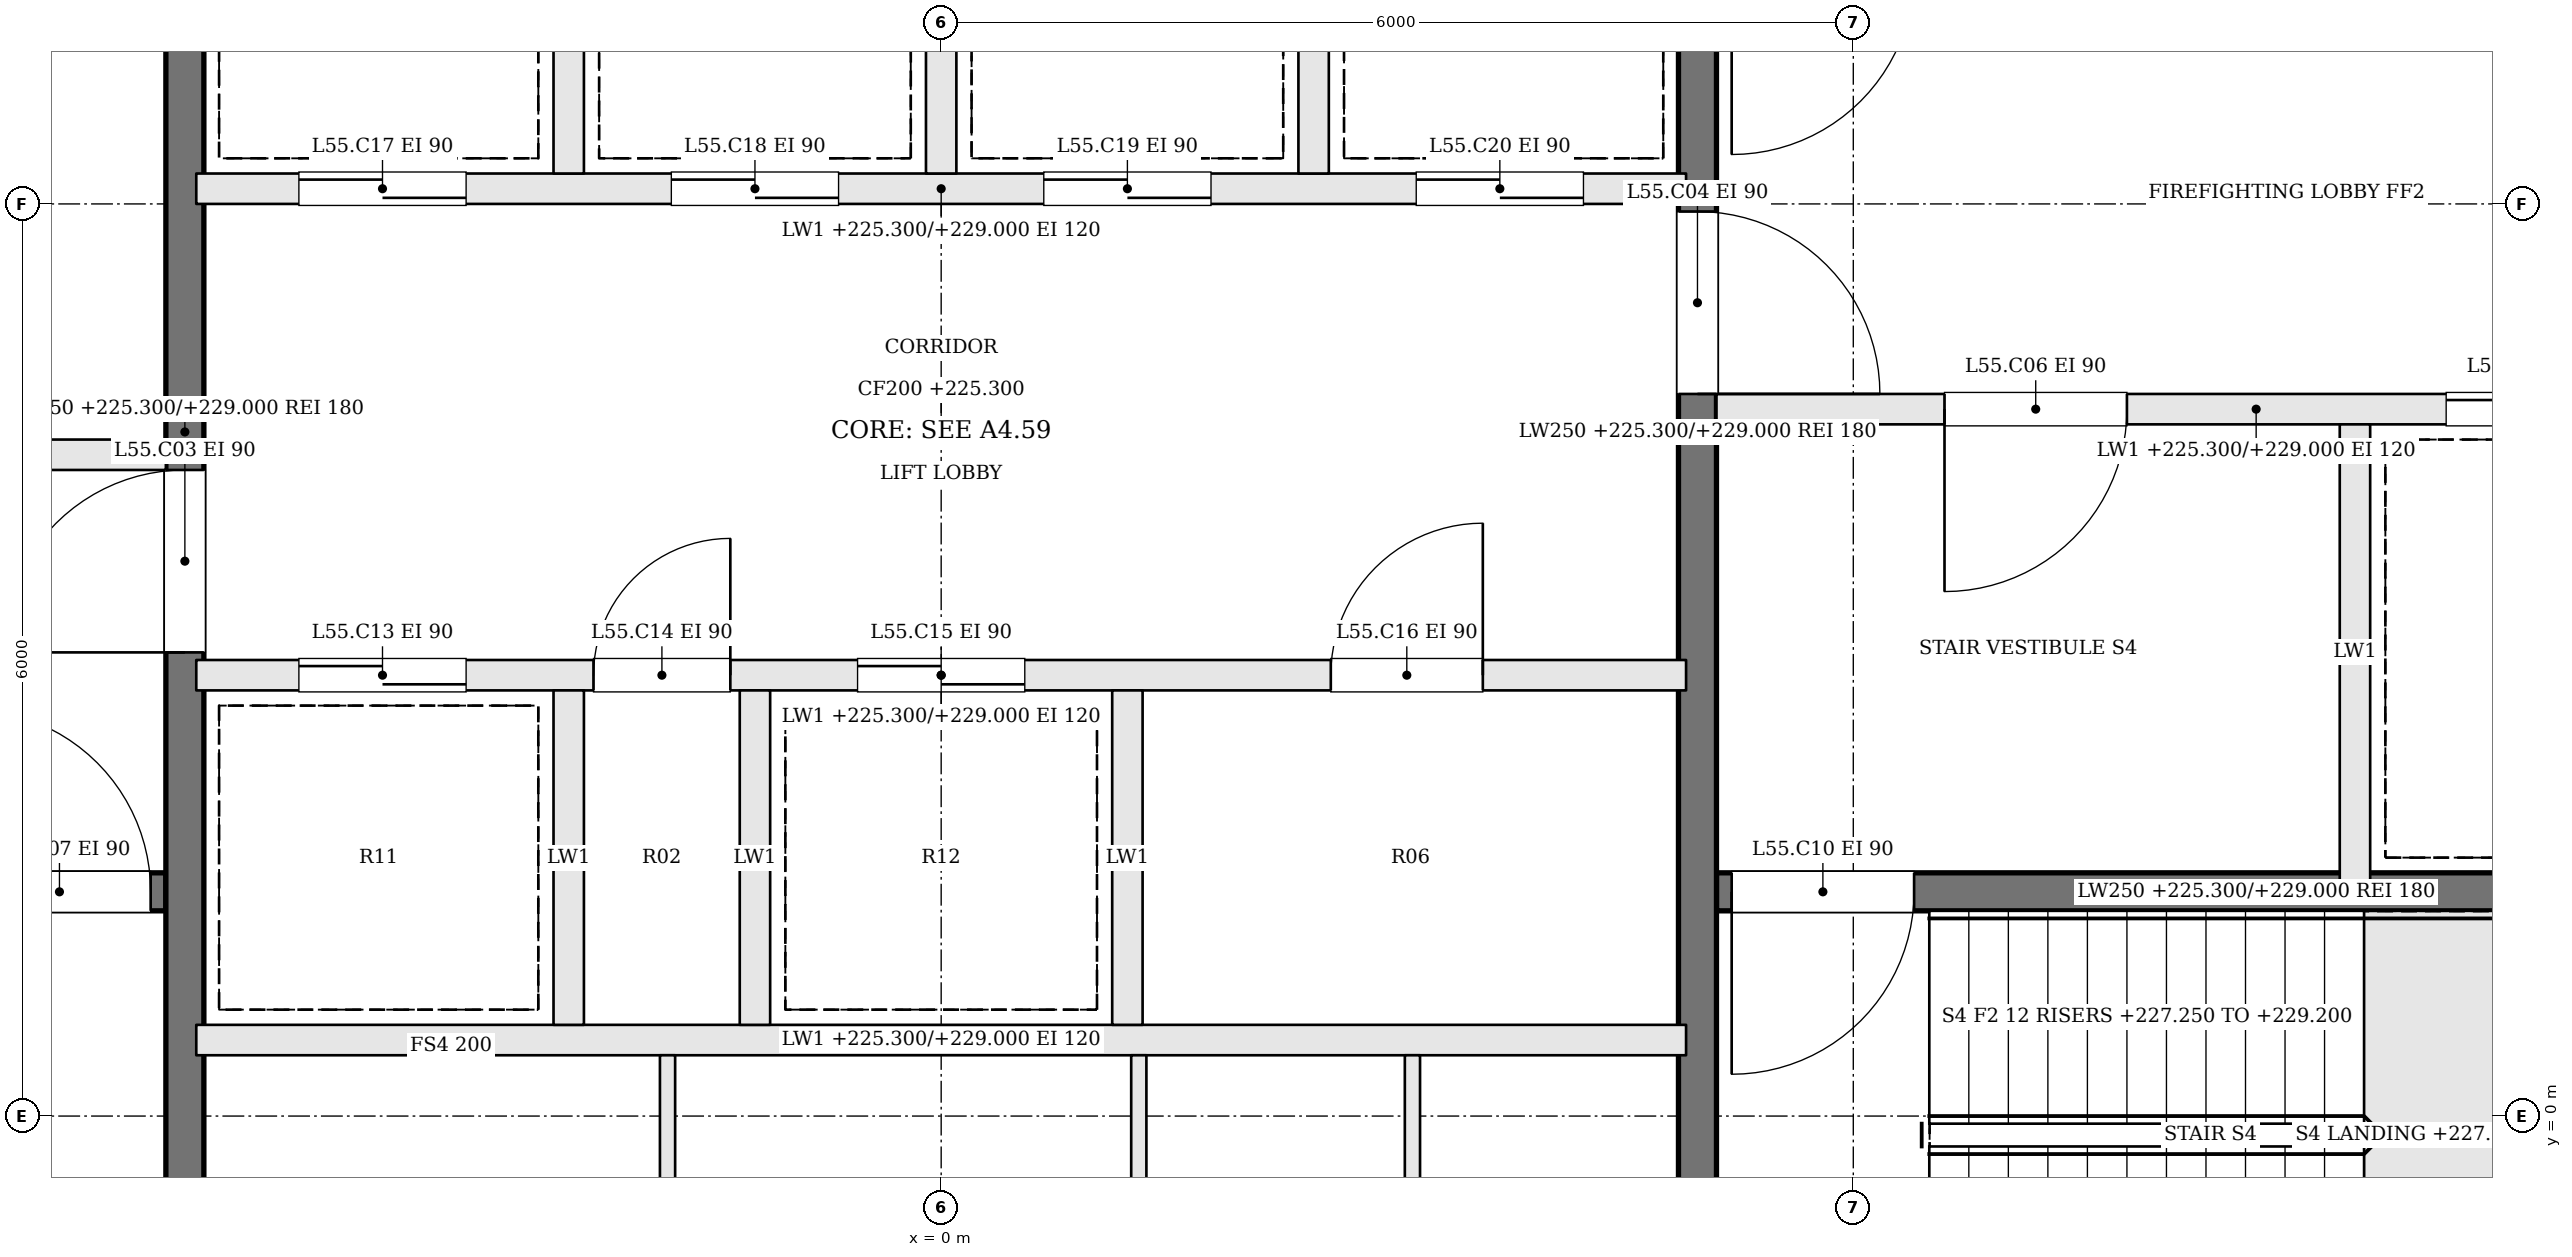
"""IFC4 building model, lengths in metres.
Left out: names, types, materials, properties, quantities, classifications, styles, units other than length and angle.
Written with IfcOpenShell. Run it as: python <this file> out.ifc"""

import sys

from ifc_helpers import new_model, si_unit, direction, frame, frame_2d, origin, place, context, subcontext, project, spatial, rectangle, extrude, element, fill, save


model = new_model("IFC4")
c1 = context("Model", 3, precision=1e-05, world=origin(), true_north=direction((0.0, 1.0)))
c2 = subcontext(c1, "Body", "Model", "MODEL_VIEW")
j1 = project(units=[si_unit("LENGTHUNIT", "METRE"), si_unit("PLANEANGLEUNIT", "RADIAN")], contexts=[c1])
p1 = place(None, origin())
s1 = spatial("IfcSite", under=j1, at=p1, CompositionType="ELEMENT")
p2 = place(p1, origin())
s2 = spatial("IfcBuilding", under=s1, at=p2, CompositionType="ELEMENT")
p3 = place(p2, frame((0.0, 0.0, 225.3)))
s3 = spatial("IfcBuildingStorey", under=s2, at=p3, CompositionType="ELEMENT", Elevation=225.3)
p4 = place(p3, frame((-12.2, 1.475, 0.0), z_axis=(0.0, 0.0, 1.0), x_axis=(1.0, 0.0, 0.0)))
e1 = element("IfcWall", 1, at=p4, inside=s3, PredefinedType="SOLIDWALL", context=c2, shape_type="SweptSolid", body=[
    extrude(rectangle(XDim=7.1, YDim=0.25, at=frame_2d((3.55, 0.0))), origin(), (0.0, 0.0, 1.0), 3.7),
])
p5 = place(p4, frame((5.8, 0.0, 0.0)))
e2 = element("IfcOpeningElement", 2, at=p5, cuts=e1, PredefinedType="OPENING", context=c2, shape_type="SweptSolid", body=[
    extrude(rectangle(XDim=1.2, YDim=2.1, at=frame_2d((0.6, 1.05))), frame((0.0, 0.135, 0.0), z_axis=(0.0, -1.0, 0.0), x_axis=(1.0, 0.0, 0.0)), (0.0, 0.0, 1.0), 0.27),
])
p6 = place(p3, frame((-12.2, 4.35, 0.0), z_axis=(0.0, 0.0, 1.0), x_axis=(1.0, 0.0, 0.0)))
e3 = element("IfcWall", 3, at=p6, inside=s3, PredefinedType="SOLIDWALL", context=c2, shape_type="SweptSolid", body=[
    extrude(rectangle(XDim=7.1, YDim=0.2, at=frame_2d((3.55, 0.0))), origin(), (0.0, 0.0, 1.0), 3.7),
])
p7 = place(p6, frame((4.4, 0.0, 0.0)))
e4 = element("IfcOpeningElement", 4, at=p7, cuts=e3, PredefinedType="OPENING", context=c2, shape_type="SweptSolid", body=[
    extrude(rectangle(XDim=1.2, YDim=2.1, at=frame_2d((0.6, 1.05))), frame((0.0, 0.11, 0.0), z_axis=(0.0, -1.0, 0.0), x_axis=(1.0, 0.0, 0.0)), (0.0, 0.0, 1.0), 0.22),
])
p8 = place(p6, frame((1.1, 0.0, 0.0)))
e5 = element("IfcOpeningElement", 5, at=p8, cuts=e3, PredefinedType="OPENING", context=c2, shape_type="SweptSolid", body=[
    extrude(rectangle(XDim=1.2, YDim=2.1, at=frame_2d((0.6, 1.05))), frame((0.0, 0.11, 0.0), z_axis=(0.0, -1.0, 0.0), x_axis=(1.0, 0.0, 0.0)), (0.0, 0.0, 1.0), 0.22),
])
p9 = place(p3, frame((12.2, 4.65, 0.0), z_axis=(0.0, 0.0, 1.0), x_axis=(-1.0, 0.0, 0.0)))
e6 = element("IfcWall", 6, at=p9, inside=s3, PredefinedType="SOLIDWALL", context=c2, shape_type="SweptSolid", body=[
    extrude(rectangle(XDim=7.1, YDim=0.2, at=frame_2d((3.55, 0.0))), origin(), (0.0, 0.0, 1.0), 3.7),
])
p10 = place(p9, frame((4.4, 0.0, 0.0)))
e7 = element("IfcOpeningElement", 7, at=p10, cuts=e6, PredefinedType="OPENING", context=c2, shape_type="SweptSolid", body=[
    extrude(rectangle(XDim=1.2, YDim=2.1, at=frame_2d((0.6, 1.05))), frame((0.0, 0.11, 0.0), z_axis=(0.0, -1.0, 0.0), x_axis=(1.0, 0.0, 0.0)), (0.0, 0.0, 1.0), 0.22),
])
p11 = place(p9, frame((1.1, 0.0, 0.0)))
e8 = element("IfcOpeningElement", 8, at=p11, cuts=e6, PredefinedType="OPENING", context=c2, shape_type="SweptSolid", body=[
    extrude(rectangle(XDim=1.2, YDim=2.1, at=frame_2d((0.6, 1.05))), frame((0.0, 0.11, 0.0), z_axis=(0.0, -1.0, 0.0), x_axis=(1.0, 0.0, 0.0)), (0.0, 0.0, 1.0), 0.22),
])
p12 = place(p3, frame((12.2, 1.475, 0.0), z_axis=(0.0, 0.0, 1.0), x_axis=(-1.0, 0.0, 0.0)))
e9 = element("IfcWall", 9, at=p12, inside=s3, PredefinedType="SOLIDWALL", context=c2, shape_type="SweptSolid", body=[
    extrude(rectangle(XDim=7.1, YDim=0.25, at=frame_2d((3.55, 0.0))), origin(), (0.0, 0.0, 1.0), 3.7),
])
p13 = place(p12, frame((5.8, 0.0, 0.0)))
e10 = element("IfcOpeningElement", 10, at=p13, cuts=e9, PredefinedType="OPENING", context=c2, shape_type="SweptSolid", body=[
    extrude(rectangle(XDim=1.2, YDim=2.1, at=frame_2d((0.6, 1.05))), frame((0.0, 0.135, 0.0), z_axis=(0.0, -1.0, 0.0), x_axis=(1.0, 0.0, 0.0)), (0.0, 0.0, 1.0), 0.27),
])
p14 = place(p3, frame((9.3, 4.55, 0.0), z_axis=(0.0, 0.0, 1.0), x_axis=(0.0, -1.0, 0.0)))
e11 = element("IfcWall", 11, at=p14, inside=s3, PredefinedType="SOLIDWALL", context=c2, shape_type="SweptSolid", body=[
    extrude(rectangle(XDim=3.0, YDim=0.2, at=frame_2d((1.5, 0.0))), origin(), (0.0, 0.0, 1.0), 3.7),
])
p15 = place(p3, frame((-4.975, -2.2, 0.0), z_axis=(0.0, 0.0, 1.0), x_axis=(0.0, 1.0, 0.0)))
e12 = element("IfcWall", 12, at=p15, inside=s3, PredefinedType="SOLIDWALL", context=c2, shape_type="SweptSolid", body=[
    extrude(rectangle(XDim=13.4, YDim=0.25, at=frame_2d((6.7, 0.0))), origin(), (0.0, 0.0, 1.0), 3.7),
])
p16 = place(p15, frame((5.25, 0.0, 0.0)))
e13 = element("IfcOpeningElement", 13, at=p16, cuts=e12, PredefinedType="OPENING", context=c2, shape_type="SweptSolid", body=[
    extrude(rectangle(XDim=1.2, YDim=2.1, at=frame_2d((0.6, 1.05))), frame((0.0, 0.135, 0.0), z_axis=(0.0, -1.0, 0.0), x_axis=(1.0, 0.0, 0.0)), (0.0, 0.0, 1.0), 0.27),
])
p17 = place(p3, frame((4.975, 11.2, 0.0), z_axis=(0.0, 0.0, 1.0), x_axis=(0.0, -1.0, 0.0)))
e14 = element("IfcWall", 14, at=p17, inside=s3, PredefinedType="SOLIDWALL", context=c2, shape_type="SweptSolid", body=[
    extrude(rectangle(XDim=13.4, YDim=0.25, at=frame_2d((6.7, 0.0))), origin(), (0.0, 0.0, 1.0), 3.7),
])
p18 = place(p17, frame((5.25, 0.0, 0.0)))
e15 = element("IfcOpeningElement", 15, at=p18, cuts=e14, PredefinedType="OPENING", context=c2, shape_type="SweptSolid", body=[
    extrude(rectangle(XDim=1.2, YDim=2.1, at=frame_2d((0.6, 1.05))), frame((0.0, 0.135, 0.0), z_axis=(0.0, -1.0, 0.0), x_axis=(1.0, 0.0, 0.0)), (0.0, 0.0, 1.0), 0.27),
])
p19 = place(p3, frame((-4.9, 0.5, 0.0), z_axis=(0.0, 0.0, 1.0), x_axis=(1.0, 0.0, 0.0)))
e16 = element("IfcWall", 16, at=p19, inside=s3, PredefinedType="SOLIDWALL", context=c2, shape_type="SweptSolid", body=[
    extrude(rectangle(XDim=9.8, YDim=0.2, at=frame_2d((4.9, 0.0))), origin(), (0.0, 0.0, 1.0), 3.7),
])
p20 = place(p3, frame((-4.9, 2.9, 0.0), z_axis=(0.0, 0.0, 1.0), x_axis=(1.0, 0.0, 0.0)))
e17 = element("IfcWall", 17, at=p20, inside=s3, PredefinedType="SOLIDWALL", context=c2, shape_type="SweptSolid", body=[
    extrude(rectangle(XDim=9.8, YDim=0.2, at=frame_2d((4.9, 0.0))), origin(), (0.0, 0.0, 1.0), 3.7),
])
p21 = place(p20, frame((0.675, 0.0, 0.0)))
e18 = element("IfcOpeningElement", 18, at=p21, cuts=e17, PredefinedType="OPENING", context=c2, shape_type="SweptSolid", body=[
    extrude(rectangle(XDim=1.1, YDim=2.1, at=frame_2d((0.55, 1.05))), frame((0.0, 0.11, 0.0), z_axis=(0.0, -1.0, 0.0), x_axis=(1.0, 0.0, 0.0)), (0.0, 0.0, 1.0), 0.22),
])
p22 = place(p20, frame((2.613, 0.0, 0.0)))
e19 = element("IfcOpeningElement", 19, at=p22, cuts=e17, PredefinedType="OPENING", context=c2, shape_type="SweptSolid", body=[
    extrude(rectangle(XDim=0.9, YDim=2.1, at=frame_2d((0.45, 1.05))), frame((0.0, 0.11, 0.0), z_axis=(0.0, -1.0, 0.0), x_axis=(1.0, 0.0, 0.0)), (0.0, 0.0, 1.0), 0.22),
])
p23 = place(p20, frame((4.35, 0.0, 0.0)))
e20 = element("IfcOpeningElement", 20, at=p23, cuts=e17, PredefinedType="OPENING", context=c2, shape_type="SweptSolid", body=[
    extrude(rectangle(XDim=1.1, YDim=2.1, at=frame_2d((0.55, 1.05))), frame((0.0, 0.11, 0.0), z_axis=(0.0, -1.0, 0.0), x_axis=(1.0, 0.0, 0.0)), (0.0, 0.0, 1.0), 0.22),
])
p24 = place(p20, frame((7.463, 0.0, 0.0)))
e21 = element("IfcOpeningElement", 21, at=p24, cuts=e17, PredefinedType="OPENING", context=c2, shape_type="SweptSolid", body=[
    extrude(rectangle(XDim=1.0, YDim=2.1, at=frame_2d((0.5, 1.05))), frame((0.0, 0.11, 0.0), z_axis=(0.0, -1.0, 0.0), x_axis=(1.0, 0.0, 0.0)), (0.0, 0.0, 1.0), 0.22),
])
p25 = place(p3, frame((-4.9, 6.1, 0.0), z_axis=(0.0, 0.0, 1.0), x_axis=(1.0, 0.0, 0.0)))
e22 = element("IfcWall", 22, at=p25, inside=s3, PredefinedType="SOLIDWALL", context=c2, shape_type="SweptSolid", body=[
    extrude(rectangle(XDim=9.8, YDim=0.2, at=frame_2d((4.9, 0.0))), origin(), (0.0, 0.0, 1.0), 3.7),
])
p26 = place(p25, frame((0.675, 0.0, 0.0)))
e23 = element("IfcOpeningElement", 23, at=p26, cuts=e22, PredefinedType="OPENING", context=c2, shape_type="SweptSolid", body=[
    extrude(rectangle(XDim=1.1, YDim=2.1, at=frame_2d((0.55, 1.05))), frame((0.0, 0.11, 0.0), z_axis=(0.0, -1.0, 0.0), x_axis=(1.0, 0.0, 0.0)), (0.0, 0.0, 1.0), 0.22),
])
p27 = place(p25, frame((3.125, 0.0, 0.0)))
e24 = element("IfcOpeningElement", 24, at=p27, cuts=e22, PredefinedType="OPENING", context=c2, shape_type="SweptSolid", body=[
    extrude(rectangle(XDim=1.1, YDim=2.1, at=frame_2d((0.55, 1.05))), frame((0.0, 0.11, 0.0), z_axis=(0.0, -1.0, 0.0), x_axis=(1.0, 0.0, 0.0)), (0.0, 0.0, 1.0), 0.22),
])
p28 = place(p25, frame((5.575, 0.0, 0.0)))
e25 = element("IfcOpeningElement", 25, at=p28, cuts=e22, PredefinedType="OPENING", context=c2, shape_type="SweptSolid", body=[
    extrude(rectangle(XDim=1.1, YDim=2.1, at=frame_2d((0.55, 1.05))), frame((0.0, 0.11, 0.0), z_axis=(0.0, -1.0, 0.0), x_axis=(1.0, 0.0, 0.0)), (0.0, 0.0, 1.0), 0.22),
])
p29 = place(p25, frame((8.025, 0.0, 0.0)))
e26 = element("IfcOpeningElement", 26, at=p29, cuts=e22, PredefinedType="OPENING", context=c2, shape_type="SweptSolid", body=[
    extrude(rectangle(XDim=1.1, YDim=2.1, at=frame_2d((0.55, 1.05))), frame((0.0, 0.11, 0.0), z_axis=(0.0, -1.0, 0.0), x_axis=(1.0, 0.0, 0.0)), (0.0, 0.0, 1.0), 0.22),
])
for number, where, z_axis, x_axis in (
    (27, (-2.45, 0.6, 0.0), (0.0, 0.0, 1.0), (0.0, 1.0, 0.0)),
    (28, (-1.225, 0.6, 0.0), (0.0, 0.0, 1.0), (0.0, 1.0, 0.0)),
    (29, (1.225, 0.6, 0.0), (0.0, 0.0, 1.0), (0.0, 1.0, 0.0)),
    (30, (-2.45, 6.2, 0.0), (0.0, 0.0, 1.0), (0.0, 1.0, 0.0)),
    (31, (0.0, 6.2, 0.0), (0.0, 0.0, 1.0), (0.0, 1.0, 0.0)),
    (32, (2.45, 6.2, 0.0), (0.0, 0.0, 1.0), (0.0, 1.0, 0.0)),
):
    element("IfcWall", number, at=place(p3, frame(where, z_axis=z_axis, x_axis=x_axis)), inside=s3, PredefinedType="SOLIDWALL", context=c2, shape_type="SweptSolid", body=[
        extrude(rectangle(XDim=2.2, YDim=0.2, at=frame_2d((1.1, 0.0))), origin(), (0.0, 0.0, 1.0), 3.7),
    ])
for number, where, z_axis, x_axis in (
    (33, (-1.8, -2.2, 0.0), (0.0, 0.0, 1.0), (0.0, 1.0, 0.0)),
    (34, (1.3, -2.2, 0.0), (0.0, 0.0, 1.0), (0.0, 1.0, 0.0)),
    (35, (3.1, -2.2, 0.0), (0.0, 0.0, 1.0), (0.0, 1.0, 0.0)),
):
    element("IfcWall", number, at=place(p3, frame(where, z_axis=z_axis, x_axis=x_axis)), inside=s3, PredefinedType="PARTITIONING", context=c2, shape_type="SweptSolid", body=[
        extrude(rectangle(XDim=2.6, YDim=0.1, at=frame_2d((1.3, 0.0))), origin(), (0.0, 0.0, 1.0), 3.7),
    ])
p30 = place(p16, origin())
e36 = element("IfcDoor", 36, at=p30, inside=s3, OperationType="SINGLE_SWING_LEFT", PredefinedType="DOOR", context=c2, shape_type="SweptSolid", body=[
    extrude(rectangle(XDim=1.2, YDim=2.1, at=frame_2d((0.6, 1.05))), frame((0.0, 0.025, 0.0), z_axis=(0.0, -1.0, 0.0), x_axis=(1.0, 0.0, 0.0)), (0.0, 0.0, 1.0), 0.05),
])
fill(e13, e36)
p31 = place(p18, origin())
e37 = element("IfcDoor", 37, at=p31, inside=s3, OperationType="SINGLE_SWING_RIGHT", PredefinedType="DOOR", context=c2, shape_type="SweptSolid", body=[
    extrude(rectangle(XDim=1.2, YDim=2.1, at=frame_2d((0.6, 1.05))), frame((0.0, 0.025, 0.0), z_axis=(0.0, -1.0, 0.0), x_axis=(1.0, 0.0, 0.0)), (0.0, 0.0, 1.0), 0.05),
])
fill(e15, e37)
p32 = place(p10, origin())
e38 = element("IfcDoor", 38, at=p32, inside=s3, OperationType="SINGLE_SWING_RIGHT", PredefinedType="DOOR", context=c2, shape_type="SweptSolid", body=[
    extrude(rectangle(XDim=1.2, YDim=2.1, at=frame_2d((0.6, 1.05))), frame((0.0, 0.025, 0.0), z_axis=(0.0, -1.0, 0.0), x_axis=(1.0, 0.0, 0.0)), (0.0, 0.0, 1.0), 0.05),
])
fill(e7, e38)
p33 = place(p5, origin())
e39 = element("IfcDoor", 39, at=p33, inside=s3, OperationType="SINGLE_SWING_LEFT", PredefinedType="DOOR", context=c2, shape_type="SweptSolid", body=[
    extrude(rectangle(XDim=1.2, YDim=2.1, at=frame_2d((0.6, 1.05))), frame((0.0, 0.025, 0.0), z_axis=(0.0, -1.0, 0.0), x_axis=(1.0, 0.0, 0.0)), (0.0, 0.0, 1.0), 0.05),
])
fill(e2, e39)
p34 = place(p13, origin())
e40 = element("IfcDoor", 40, at=p34, inside=s3, OperationType="SINGLE_SWING_RIGHT", PredefinedType="DOOR", context=c2, shape_type="SweptSolid", body=[
    extrude(rectangle(XDim=1.2, YDim=2.1, at=frame_2d((0.6, 1.05))), frame((0.0, 0.025, 0.0), z_axis=(0.0, -1.0, 0.0), x_axis=(1.0, 0.0, 0.0)), (0.0, 0.0, 1.0), 0.05),
])
fill(e10, e40)
p35 = place(p11, origin())
e41 = element("IfcDoor", 41, at=p35, inside=s3, OperationType="SLIDING_TO_RIGHT", PredefinedType="DOOR", context=c2, shape_type="SweptSolid", body=[
    extrude(rectangle(XDim=1.2, YDim=2.1, at=frame_2d((0.6, 1.05))), frame((0.0, 0.025, 0.0), z_axis=(0.0, -1.0, 0.0), x_axis=(1.0, 0.0, 0.0)), (0.0, 0.0, 1.0), 0.05),
])
fill(e8, e41)
p36 = place(p21, origin())
e42 = element("IfcDoor", 42, at=p36, inside=s3, OperationType="SLIDING_TO_RIGHT", PredefinedType="DOOR", context=c2, shape_type="SweptSolid", body=[
    extrude(rectangle(XDim=1.1, YDim=2.1, at=frame_2d((0.55, 1.05))), frame((0.0, 0.025, 0.0), z_axis=(0.0, -1.0, 0.0), x_axis=(1.0, 0.0, 0.0)), (0.0, 0.0, 1.0), 0.05),
])
fill(e18, e42)
p37 = place(p22, origin())
e43 = element("IfcDoor", 43, at=p37, inside=s3, OperationType="SINGLE_SWING_RIGHT", PredefinedType="DOOR", context=c2, shape_type="SweptSolid", body=[
    extrude(rectangle(XDim=0.9, YDim=2.1, at=frame_2d((0.45, 1.05))), frame((0.0, 0.025, 0.0), z_axis=(0.0, -1.0, 0.0), x_axis=(1.0, 0.0, 0.0)), (0.0, 0.0, 1.0), 0.05),
])
fill(e19, e43)
p38 = place(p23, origin())
e44 = element("IfcDoor", 44, at=p38, inside=s3, OperationType="SLIDING_TO_LEFT", PredefinedType="DOOR", context=c2, shape_type="SweptSolid", body=[
    extrude(rectangle(XDim=1.1, YDim=2.1, at=frame_2d((0.55, 1.05))), frame((0.0, 0.025, 0.0), z_axis=(0.0, -1.0, 0.0), x_axis=(1.0, 0.0, 0.0)), (0.0, 0.0, 1.0), 0.05),
])
fill(e20, e44)
p39 = place(p24, origin())
e45 = element("IfcDoor", 45, at=p39, inside=s3, OperationType="SINGLE_SWING_RIGHT", PredefinedType="DOOR", context=c2, shape_type="SweptSolid", body=[
    extrude(rectangle(XDim=1.0, YDim=2.1, at=frame_2d((0.5, 1.05))), frame((0.0, 0.025, 0.0), z_axis=(0.0, -1.0, 0.0), x_axis=(1.0, 0.0, 0.0)), (0.0, 0.0, 1.0), 0.05),
])
fill(e21, e45)
p40 = place(p26, origin())
e46 = element("IfcDoor", 46, at=p40, inside=s3, OperationType="SLIDING_TO_RIGHT", PredefinedType="DOOR", context=c2, shape_type="SweptSolid", body=[
    extrude(rectangle(XDim=1.1, YDim=2.1, at=frame_2d((0.55, 1.05))), frame((0.0, 0.025, 0.0), z_axis=(0.0, -1.0, 0.0), x_axis=(1.0, 0.0, 0.0)), (0.0, 0.0, 1.0), 0.05),
])
fill(e23, e46)
p41 = place(p27, origin())
e47 = element("IfcDoor", 47, at=p41, inside=s3, OperationType="SLIDING_TO_LEFT", PredefinedType="DOOR", context=c2, shape_type="SweptSolid", body=[
    extrude(rectangle(XDim=1.1, YDim=2.1, at=frame_2d((0.55, 1.05))), frame((0.0, 0.025, 0.0), z_axis=(0.0, -1.0, 0.0), x_axis=(1.0, 0.0, 0.0)), (0.0, 0.0, 1.0), 0.05),
])
fill(e24, e47)
p42 = place(p28, origin())
e48 = element("IfcDoor", 48, at=p42, inside=s3, OperationType="SLIDING_TO_RIGHT", PredefinedType="DOOR", context=c2, shape_type="SweptSolid", body=[
    extrude(rectangle(XDim=1.1, YDim=2.1, at=frame_2d((0.55, 1.05))), frame((0.0, 0.025, 0.0), z_axis=(0.0, -1.0, 0.0), x_axis=(1.0, 0.0, 0.0)), (0.0, 0.0, 1.0), 0.05),
])
fill(e25, e48)
p43 = place(p29, origin())
e49 = element("IfcDoor", 49, at=p43, inside=s3, OperationType="SLIDING_TO_LEFT", PredefinedType="DOOR", context=c2, shape_type="SweptSolid", body=[
    extrude(rectangle(XDim=1.1, YDim=2.1, at=frame_2d((0.55, 1.05))), frame((0.0, 0.025, 0.0), z_axis=(0.0, -1.0, 0.0), x_axis=(1.0, 0.0, 0.0)), (0.0, 0.0, 1.0), 0.05),
])
fill(e26, e49)
save(model, sys.argv[1])
